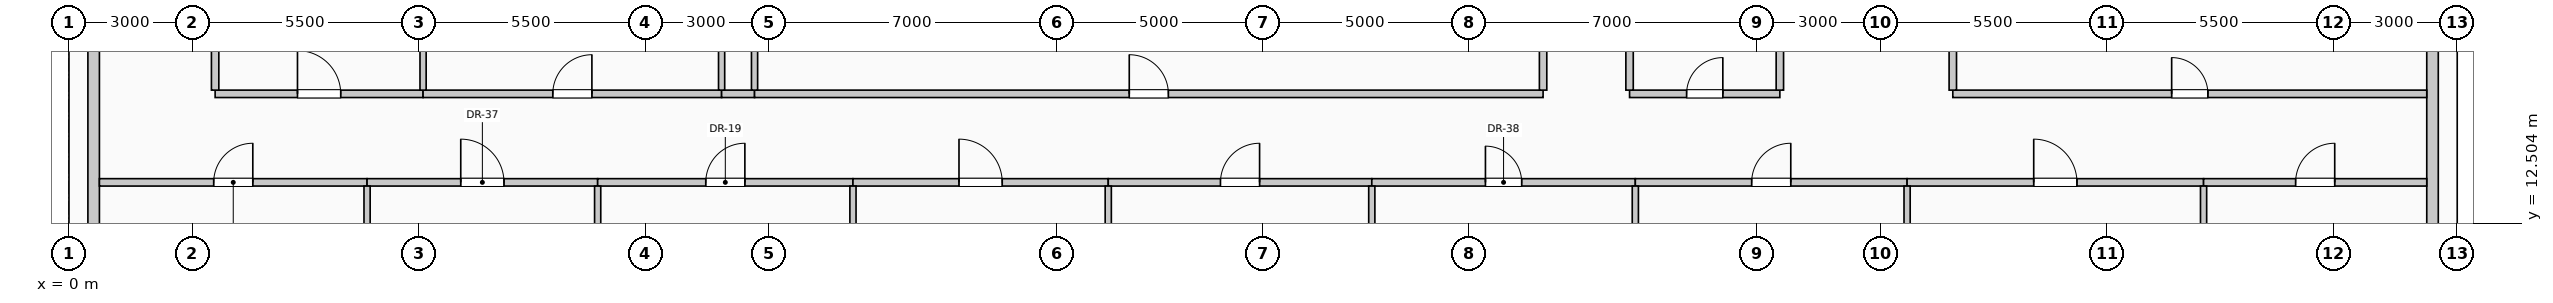
"""IFC4 building model, lengths in metres.
Left out: names, types, materials, properties, quantities, classifications, styles, units other than length and angle.
Written with IfcOpenShell. Run it as: python <this file> out.ifc"""

import sys

from ifc_helpers import new_model, si_unit, direction, frame, frame_2d, origin, place, context, subcontext, project, spatial, rectangle, extrude, element, fill, save


model = new_model("IFC4")
c1 = context("Model", 3, precision=1e-05, world=origin(), true_north=direction((0.0, 1.0)))
c2 = subcontext(c1, "Body", "Model", "MODEL_VIEW")
j1 = project(units=[si_unit("LENGTHUNIT", "METRE"), si_unit("PLANEANGLEUNIT", "RADIAN")], contexts=[c1])
p1 = place(None, origin())
s1 = spatial("IfcSite", under=j1, at=p1, CompositionType="ELEMENT")
p2 = place(p1, origin())
s2 = spatial("IfcBuilding", under=s1, at=p2, CompositionType="ELEMENT")
p3 = place(p2, frame((0.0, 0.0, 144.6)))
s3 = spatial("IfcBuildingStorey", under=s2, at=p3, CompositionType="ELEMENT", Elevation=144.6)
for number, where, z_axis, x_axis in (
    (1, (0.6, 10.445, 0.0), (0.0, 0.0, 1.0), (0.0, 1.0, 0.0)),
    (2, (57.4, 17.555, 0.0), (0.0, 0.0, 1.0), (0.0, -1.0, 0.0)),
):
    element("IfcWall", number, at=place(p3, frame(where, z_axis=z_axis, x_axis=x_axis)), inside=s3, PredefinedType="SOLIDWALL", context=c2, shape_type="SweptSolid", body=[
        extrude(rectangle(XDim=7.11, YDim=0.28, at=frame_2d((3.555, 0.0))), origin(), (0.0, 0.0, 1.0), 2.875),
    ])
p4 = place(p3, frame((0.74, 13.5, 0.0), z_axis=(0.0, 0.0, 1.0), x_axis=(1.0, 0.0, 0.0)))
e3 = element("IfcWall", 3, at=p4, inside=s3, PredefinedType="PARTITIONING", context=c2, shape_type="SweptSolid", body=[
    extrude(rectangle(XDim=6.5, YDim=0.18, at=frame_2d((3.25, 0.0))), origin(), (0.0, 0.0, 1.0), 3.725),
])
p5 = place(p4, frame((2.775, 0.0, 0.0)))
e4 = element("IfcOpeningElement", 4, at=p5, cuts=e3, PredefinedType="OPENING", context=c2, shape_type="SweptSolid", body=[
    extrude(rectangle(XDim=0.95, YDim=2.15, at=frame_2d((0.475, 1.075))), frame((0.0, 0.1, 0.0), z_axis=(0.0, -1.0, 0.0), x_axis=(1.0, 0.0, 0.0)), (0.0, 0.0, 1.0), 0.2),
])
p6 = place(p3, frame((7.24, 13.5, 0.0), z_axis=(0.0, 0.0, 1.0), x_axis=(1.0, 0.0, 0.0)))
e5 = element("IfcWall", 5, at=p6, inside=s3, PredefinedType="PARTITIONING", context=c2, shape_type="SweptSolid", body=[
    extrude(rectangle(XDim=5.6, YDim=0.18, at=frame_2d((2.8, 0.0))), origin(), (0.0, 0.0, 1.0), 3.725),
])
p7 = place(p6, frame((2.275, 0.0, 0.0)))
e6 = element("IfcOpeningElement", 6, at=p7, cuts=e5, PredefinedType="OPENING", context=c2, shape_type="SweptSolid", body=[
    extrude(rectangle(XDim=1.05, YDim=2.15, at=frame_2d((0.525, 1.075))), frame((0.0, 0.1, 0.0), z_axis=(0.0, -1.0, 0.0), x_axis=(1.0, 0.0, 0.0)), (0.0, 0.0, 1.0), 0.2),
])
p8 = place(p3, frame((12.84, 13.5, 0.0), z_axis=(0.0, 0.0, 1.0), x_axis=(1.0, 0.0, 0.0)))
e7 = element("IfcWall", 7, at=p8, inside=s3, PredefinedType="PARTITIONING", context=c2, shape_type="SweptSolid", body=[
    extrude(rectangle(XDim=6.2, YDim=0.18, at=frame_2d((3.1, 0.0))), origin(), (0.0, 0.0, 1.0), 3.725),
])
p9 = place(p8, frame((2.625, 0.0, 0.0)))
e8 = element("IfcOpeningElement", 8, at=p9, cuts=e7, PredefinedType="OPENING", context=c2, shape_type="SweptSolid", body=[
    extrude(rectangle(XDim=0.95, YDim=2.15, at=frame_2d((0.475, 1.075))), frame((0.0, 0.1, 0.0), z_axis=(0.0, -1.0, 0.0), x_axis=(1.0, 0.0, 0.0)), (0.0, 0.0, 1.0), 0.2),
])
p10 = place(p3, frame((19.04, 13.5, 0.0), z_axis=(0.0, 0.0, 1.0), x_axis=(1.0, 0.0, 0.0)))
e9 = element("IfcWall", 9, at=p10, inside=s3, PredefinedType="PARTITIONING", context=c2, shape_type="SweptSolid", body=[
    extrude(rectangle(XDim=6.2, YDim=0.18, at=frame_2d((3.1, 0.0))), origin(), (0.0, 0.0, 1.0), 3.725),
])
p11 = place(p10, frame((2.575, 0.0, 0.0)))
e10 = element("IfcOpeningElement", 10, at=p11, cuts=e9, PredefinedType="OPENING", context=c2, shape_type="SweptSolid", body=[
    extrude(rectangle(XDim=1.05, YDim=2.15, at=frame_2d((0.525, 1.075))), frame((0.0, 0.1, 0.0), z_axis=(0.0, -1.0, 0.0), x_axis=(1.0, 0.0, 0.0)), (0.0, 0.0, 1.0), 0.2),
])
p12 = place(p3, frame((25.24, 13.5, 0.0), z_axis=(0.0, 0.0, 1.0), x_axis=(1.0, 0.0, 0.0)))
e11 = element("IfcWall", 11, at=p12, inside=s3, PredefinedType="PARTITIONING", context=c2, shape_type="SweptSolid", body=[
    extrude(rectangle(XDim=6.4, YDim=0.18, at=frame_2d((3.2, 0.0))), origin(), (0.0, 0.0, 1.0), 3.725),
])
p13 = place(p12, frame((2.725, 0.0, 0.0)))
e12 = element("IfcOpeningElement", 12, at=p13, cuts=e11, PredefinedType="OPENING", context=c2, shape_type="SweptSolid", body=[
    extrude(rectangle(XDim=0.95, YDim=2.15, at=frame_2d((0.475, 1.075))), frame((0.0, 0.1, 0.0), z_axis=(0.0, -1.0, 0.0), x_axis=(1.0, 0.0, 0.0)), (0.0, 0.0, 1.0), 0.2),
])
p14 = place(p3, frame((31.64, 13.5, 0.0), z_axis=(0.0, 0.0, 1.0), x_axis=(1.0, 0.0, 0.0)))
e13 = element("IfcWall", 13, at=p14, inside=s3, PredefinedType="PARTITIONING", context=c2, shape_type="SweptSolid", body=[
    extrude(rectangle(XDim=6.4, YDim=0.18, at=frame_2d((3.2, 0.0))), origin(), (0.0, 0.0, 1.0), 3.725),
])
p15 = place(p14, frame((2.76, 0.0, 0.0)))
e14 = element("IfcOpeningElement", 14, at=p15, cuts=e13, PredefinedType="OPENING", context=c2, shape_type="SweptSolid", body=[
    extrude(rectangle(XDim=0.88, YDim=2.1, at=frame_2d((0.44, 1.05))), frame((0.0, 0.1, 0.0), z_axis=(0.0, -1.0, 0.0), x_axis=(1.0, 0.0, 0.0)), (0.0, 0.0, 1.0), 0.2),
])
p16 = place(p3, frame((38.04, 13.5, 0.0), z_axis=(0.0, 0.0, 1.0), x_axis=(1.0, 0.0, 0.0)))
e15 = element("IfcWall", 15, at=p16, inside=s3, PredefinedType="PARTITIONING", context=c2, shape_type="SweptSolid", body=[
    extrude(rectangle(XDim=6.6, YDim=0.18, at=frame_2d((3.3, 0.0))), origin(), (0.0, 0.0, 1.0), 3.725),
])
p17 = place(p16, frame((2.825, 0.0, 0.0)))
e16 = element("IfcOpeningElement", 16, at=p17, cuts=e15, PredefinedType="OPENING", context=c2, shape_type="SweptSolid", body=[
    extrude(rectangle(XDim=0.95, YDim=2.15, at=frame_2d((0.475, 1.075))), frame((0.0, 0.1, 0.0), z_axis=(0.0, -1.0, 0.0), x_axis=(1.0, 0.0, 0.0)), (0.0, 0.0, 1.0), 0.2),
])
p18 = place(p3, frame((44.64, 13.5, 0.0), z_axis=(0.0, 0.0, 1.0), x_axis=(1.0, 0.0, 0.0)))
e17 = element("IfcWall", 17, at=p18, inside=s3, PredefinedType="PARTITIONING", context=c2, shape_type="SweptSolid", body=[
    extrude(rectangle(XDim=7.2, YDim=0.18, at=frame_2d((3.6, 0.0))), origin(), (0.0, 0.0, 1.0), 3.725),
])
p19 = place(p18, frame((3.075, 0.0, 0.0)))
e18 = element("IfcOpeningElement", 18, at=p19, cuts=e17, PredefinedType="OPENING", context=c2, shape_type="SweptSolid", body=[
    extrude(rectangle(XDim=1.05, YDim=2.15, at=frame_2d((0.525, 1.075))), frame((0.0, 0.1, 0.0), z_axis=(0.0, -1.0, 0.0), x_axis=(1.0, 0.0, 0.0)), (0.0, 0.0, 1.0), 0.2),
])
p20 = place(p3, frame((51.84, 13.5, 0.0), z_axis=(0.0, 0.0, 1.0), x_axis=(1.0, 0.0, 0.0)))
e19 = element("IfcWall", 19, at=p20, inside=s3, PredefinedType="PARTITIONING", context=c2, shape_type="SweptSolid", body=[
    extrude(rectangle(XDim=5.42, YDim=0.18, at=frame_2d((2.71, 0.0))), origin(), (0.0, 0.0, 1.0), 3.725),
])
p21 = place(p20, frame((2.235, 0.0, 0.0)))
e20 = element("IfcOpeningElement", 20, at=p21, cuts=e19, PredefinedType="OPENING", context=c2, shape_type="SweptSolid", body=[
    extrude(rectangle(XDim=0.95, YDim=2.15, at=frame_2d((0.475, 1.075))), frame((0.0, 0.1, 0.0), z_axis=(0.0, -1.0, 0.0), x_axis=(1.0, 0.0, 0.0)), (0.0, 0.0, 1.0), 0.2),
])
p22 = place(p3, frame((3.55, 15.65, 0.0), z_axis=(0.0, 0.0, 1.0), x_axis=(1.0, 0.0, 0.0)))
e21 = element("IfcWall", 21, at=p22, inside=s3, PredefinedType="PARTITIONING", context=c2, shape_type="SweptSolid", body=[
    extrude(rectangle(XDim=5.05, YDim=0.18, at=frame_2d((2.525, 0.0))), origin(), (0.0, 0.0, 1.0), 3.725),
])
p23 = place(p22, frame((2.0, 0.0, 0.0)))
e22 = element("IfcOpeningElement", 22, at=p23, cuts=e21, PredefinedType="OPENING", context=c2, shape_type="SweptSolid", body=[
    extrude(rectangle(XDim=1.05, YDim=2.15, at=frame_2d((0.525, 1.075))), frame((0.0, 0.1, 0.0), z_axis=(0.0, -1.0, 0.0), x_axis=(1.0, 0.0, 0.0)), (0.0, 0.0, 1.0), 0.2),
])
p24 = place(p3, frame((8.6, 15.65, 0.0), z_axis=(0.0, 0.0, 1.0), x_axis=(1.0, 0.0, 0.0)))
e23 = element("IfcWall", 23, at=p24, inside=s3, PredefinedType="PARTITIONING", context=c2, shape_type="SweptSolid", body=[
    extrude(rectangle(XDim=7.25, YDim=0.18, at=frame_2d((3.625, 0.0))), origin(), (0.0, 0.0, 1.0), 3.725),
])
p25 = place(p24, frame((3.15, 0.0, 0.0)))
e24 = element("IfcOpeningElement", 24, at=p25, cuts=e23, PredefinedType="OPENING", context=c2, shape_type="SweptSolid", body=[
    extrude(rectangle(XDim=0.95, YDim=2.15, at=frame_2d((0.475, 1.075))), frame((0.0, 0.1, 0.0), z_axis=(0.0, -1.0, 0.0), x_axis=(1.0, 0.0, 0.0)), (0.0, 0.0, 1.0), 0.2),
])
p26 = place(p3, frame((15.85, 15.65, 0.0), z_axis=(0.0, 0.0, 1.0), x_axis=(1.0, 0.0, 0.0)))
e25 = element("IfcWall", 25, at=p26, inside=s3, PredefinedType="PARTITIONING", context=c2, shape_type="SweptSolid", body=[
    extrude(rectangle(XDim=0.8, YDim=0.18, at=frame_2d((0.4, 0.0))), origin(), (0.0, 0.0, 1.0), 3.725),
])
p27 = place(p3, frame((16.65, 15.65, 0.0), z_axis=(0.0, 0.0, 1.0), x_axis=(1.0, 0.0, 0.0)))
e26 = element("IfcWall", 26, at=p27, inside=s3, PredefinedType="PARTITIONING", context=c2, shape_type="SweptSolid", body=[
    extrude(rectangle(XDim=19.15, YDim=0.18, at=frame_2d((9.575, 0.0))), origin(), (0.0, 0.0, 1.0), 3.725),
])
p28 = place(p27, frame((9.1, 0.0, 0.0)))
e27 = element("IfcOpeningElement", 27, at=p28, cuts=e26, PredefinedType="OPENING", context=c2, shape_type="SweptSolid", body=[
    extrude(rectangle(XDim=0.95, YDim=2.15, at=frame_2d((0.475, 1.075))), frame((0.0, 0.1, 0.0), z_axis=(0.0, -1.0, 0.0), x_axis=(1.0, 0.0, 0.0)), (0.0, 0.0, 1.0), 0.2),
])
p29 = place(p3, frame((37.9, 15.65, 0.0), z_axis=(0.0, 0.0, 1.0), x_axis=(1.0, 0.0, 0.0)))
e28 = element("IfcWall", 28, at=p29, inside=s3, PredefinedType="PARTITIONING", context=c2, shape_type="SweptSolid", body=[
    extrude(rectangle(XDim=3.65, YDim=0.18, at=frame_2d((1.825, 0.0))), origin(), (0.0, 0.0, 1.0), 3.725),
])
p30 = place(p29, frame((1.385, 0.0, 0.0)))
e29 = element("IfcOpeningElement", 29, at=p30, cuts=e28, PredefinedType="OPENING", context=c2, shape_type="SweptSolid", body=[
    extrude(rectangle(XDim=0.88, YDim=2.1, at=frame_2d((0.44, 1.05))), frame((0.0, 0.1, 0.0), z_axis=(0.0, -1.0, 0.0), x_axis=(1.0, 0.0, 0.0)), (0.0, 0.0, 1.0), 0.2),
])
p31 = place(p3, frame((45.75, 15.65, 0.0), z_axis=(0.0, 0.0, 1.0), x_axis=(1.0, 0.0, 0.0)))
e30 = element("IfcWall", 30, at=p31, inside=s3, PredefinedType="PARTITIONING", context=c2, shape_type="SweptSolid", body=[
    extrude(rectangle(XDim=11.51, YDim=0.18, at=frame_2d((5.755, 0.0))), origin(), (0.0, 0.0, 1.0), 3.725),
])
p32 = place(p31, frame((5.315, 0.0, 0.0)))
e31 = element("IfcOpeningElement", 31, at=p32, cuts=e30, PredefinedType="OPENING", context=c2, shape_type="SweptSolid", body=[
    extrude(rectangle(XDim=0.88, YDim=2.1, at=frame_2d((0.44, 1.05))), frame((0.0, 0.1, 0.0), z_axis=(0.0, -1.0, 0.0), x_axis=(1.0, 0.0, 0.0)), (0.0, 0.0, 1.0), 0.2),
])
p33 = place(p3, frame((3.55, 15.74, 0.0), z_axis=(0.0, 0.0, 1.0), x_axis=(0.0, 1.0, 0.0)))
e32 = element("IfcWall", 32, at=p33, inside=s3, PredefinedType="PARTITIONING", context=c2, shape_type="SweptSolid", body=[
    extrude(rectangle(XDim=3.135, YDim=0.18, at=frame_2d((1.567, 0.0))), origin(), (0.0, 0.0, 1.0), 3.725),
])
p34 = place(p3, frame((7.24, 0.74, 0.0), z_axis=(0.0, 0.0, 1.0), x_axis=(0.0, 1.0, 0.0)))
e33 = element("IfcWall", 33, at=p34, inside=s3, PredefinedType="PARTITIONING", context=c2, shape_type="SweptSolid", body=[
    extrude(rectangle(XDim=12.67, YDim=0.15, at=frame_2d((6.335, 0.0))), origin(), (0.0, 0.0, 1.0), 3.725),
])
p35 = place(p3, frame((8.6, 15.74, 0.0), z_axis=(0.0, 0.0, 1.0), x_axis=(0.0, 1.0, 0.0)))
e34 = element("IfcWall", 34, at=p35, inside=s3, PredefinedType="PARTITIONING", context=c2, shape_type="SweptSolid", body=[
    extrude(rectangle(XDim=3.135, YDim=0.15, at=frame_2d((1.567, 0.0))), origin(), (0.0, 0.0, 1.0), 3.725),
])
p36 = place(p3, frame((12.84, 0.74, 0.0), z_axis=(0.0, 0.0, 1.0), x_axis=(0.0, 1.0, 0.0)))
e35 = element("IfcWall", 35, at=p36, inside=s3, PredefinedType="PARTITIONING", context=c2, shape_type="SweptSolid", body=[
    extrude(rectangle(XDim=12.67, YDim=0.15, at=frame_2d((6.335, 0.0))), origin(), (0.0, 0.0, 1.0), 3.725),
])
p37 = place(p3, frame((15.85, 15.74, 0.0), z_axis=(0.0, 0.0, 1.0), x_axis=(0.0, 1.0, 0.0)))
e36 = element("IfcWall", 36, at=p37, inside=s3, PredefinedType="PARTITIONING", context=c2, shape_type="SweptSolid", body=[
    extrude(rectangle(XDim=1.76, YDim=0.15, at=frame_2d((0.88, 0.0))), origin(), (0.0, 0.0, 1.0), 3.725),
])
p38 = place(p3, frame((16.65, 15.74, 0.0), z_axis=(0.0, 0.0, 1.0), x_axis=(0.0, 1.0, 0.0)))
e37 = element("IfcWall", 37, at=p38, inside=s3, PredefinedType="PARTITIONING", context=c2, shape_type="SweptSolid", body=[
    extrude(rectangle(XDim=1.76, YDim=0.15, at=frame_2d((0.88, 0.0))), origin(), (0.0, 0.0, 1.0), 3.07),
])
for number, where, z_axis, x_axis in (
    (38, (19.04, 0.74, 0.0), (0.0, 0.0, 1.0), (0.0, 1.0, 0.0)),
    (39, (25.24, 0.74, 0.0), (0.0, 0.0, 1.0), (0.0, 1.0, 0.0)),
    (40, (31.64, 0.74, 0.0), (0.0, 0.0, 1.0), (0.0, 1.0, 0.0)),
):
    element("IfcWall", number, at=place(p3, frame(where, z_axis=z_axis, x_axis=x_axis)), inside=s3, PredefinedType="PARTITIONING", context=c2, shape_type="SweptSolid", body=[
        extrude(rectangle(XDim=12.67, YDim=0.15, at=frame_2d((6.335, 0.0))), origin(), (0.0, 0.0, 1.0), 3.725),
    ])
p39 = place(p3, frame((35.8, 15.74, 0.0), z_axis=(0.0, 0.0, 1.0), x_axis=(0.0, 1.0, 0.0)))
e41 = element("IfcWall", 41, at=p39, inside=s3, PredefinedType="PARTITIONING", context=c2, shape_type="SweptSolid", body=[
    extrude(rectangle(XDim=9.185, YDim=0.18, at=frame_2d((4.593, 0.0))), origin(), (0.0, 0.0, 1.0), 3.725),
])
p40 = place(p3, frame((37.9, 15.74, 0.0), z_axis=(0.0, 0.0, 1.0), x_axis=(0.0, 1.0, 0.0)))
e42 = element("IfcWall", 42, at=p40, inside=s3, PredefinedType="PARTITIONING", context=c2, shape_type="SweptSolid", body=[
    extrude(rectangle(XDim=11.17, YDim=0.18, at=frame_2d((5.585, 0.0))), origin(), (0.0, 0.0, 1.0), 3.725),
])
p41 = place(p3, frame((38.04, 0.74, 0.0), z_axis=(0.0, 0.0, 1.0), x_axis=(0.0, 1.0, 0.0)))
e43 = element("IfcWall", 43, at=p41, inside=s3, PredefinedType="PARTITIONING", context=c2, shape_type="SweptSolid", body=[
    extrude(rectangle(XDim=12.67, YDim=0.15, at=frame_2d((6.335, 0.0))), origin(), (0.0, 0.0, 1.0), 3.725),
])
p42 = place(p3, frame((41.55, 15.74, 0.0), z_axis=(0.0, 0.0, 1.0), x_axis=(0.0, 1.0, 0.0)))
e44 = element("IfcWall", 44, at=p42, inside=s3, PredefinedType="PARTITIONING", context=c2, shape_type="SweptSolid", body=[
    extrude(rectangle(XDim=1.76, YDim=0.18, at=frame_2d((0.88, 0.0))), origin(), (0.0, 0.0, 1.0), 3.07),
])
p43 = place(p3, frame((44.64, 0.74, 0.0), z_axis=(0.0, 0.0, 1.0), x_axis=(0.0, 1.0, 0.0)))
e45 = element("IfcWall", 45, at=p43, inside=s3, PredefinedType="PARTITIONING", context=c2, shape_type="SweptSolid", body=[
    extrude(rectangle(XDim=12.67, YDim=0.15, at=frame_2d((6.335, 0.0))), origin(), (0.0, 0.0, 1.0), 3.725),
])
p44 = place(p3, frame((45.75, 15.74, 0.0), z_axis=(0.0, 0.0, 1.0), x_axis=(0.0, 1.0, 0.0)))
e46 = element("IfcWall", 46, at=p44, inside=s3, PredefinedType="PARTITIONING", context=c2, shape_type="SweptSolid", body=[
    extrude(rectangle(XDim=7.035, YDim=0.18, at=frame_2d((3.518, 0.0))), origin(), (0.0, 0.0, 1.0), 3.725),
])
p45 = place(p3, frame((51.84, 0.74, 0.0), z_axis=(0.0, 0.0, 1.0), x_axis=(0.0, 1.0, 0.0)))
e47 = element("IfcWall", 47, at=p45, inside=s3, PredefinedType="PARTITIONING", context=c2, shape_type="SweptSolid", body=[
    extrude(rectangle(XDim=12.67, YDim=0.15, at=frame_2d((6.335, 0.0))), origin(), (0.0, 0.0, 1.0), 3.725),
])
p46 = place(p5, origin())
e48 = element("IfcDoor", 48, at=p46, inside=s3, OperationType="SINGLE_SWING_RIGHT", PredefinedType="DOOR", context=c2, shape_type="SweptSolid", body=[
    extrude(rectangle(XDim=0.95, YDim=2.15, at=frame_2d((0.475, 1.075))), frame((0.0, 0.025, 0.0), z_axis=(0.0, -1.0, 0.0), x_axis=(1.0, 0.0, 0.0)), (0.0, 0.0, 1.0), 0.05),
])
fill(e4, e48)
p47 = place(p7, origin())
e49 = element("IfcDoor", 49, at=p47, inside=s3, OperationType="SINGLE_SWING_LEFT", PredefinedType="DOOR", context=c2, shape_type="SweptSolid", body=[
    extrude(rectangle(XDim=1.05, YDim=2.15, at=frame_2d((0.525, 1.075))), frame((0.0, 0.025, 0.0), z_axis=(0.0, -1.0, 0.0), x_axis=(1.0, 0.0, 0.0)), (0.0, 0.0, 1.0), 0.05),
])
fill(e6, e49)
p48 = place(p9, origin())
e50 = element("IfcDoor", 50, at=p48, inside=s3, OperationType="SINGLE_SWING_RIGHT", PredefinedType="DOOR", context=c2, shape_type="SweptSolid", body=[
    extrude(rectangle(XDim=0.95, YDim=2.15, at=frame_2d((0.475, 1.075))), frame((0.0, 0.025, 0.0), z_axis=(0.0, -1.0, 0.0), x_axis=(1.0, 0.0, 0.0)), (0.0, 0.0, 1.0), 0.05),
])
fill(e8, e50)
p49 = place(p11, origin())
e51 = element("IfcDoor", 51, at=p49, inside=s3, OperationType="SINGLE_SWING_LEFT", PredefinedType="DOOR", context=c2, shape_type="SweptSolid", body=[
    extrude(rectangle(XDim=1.05, YDim=2.15, at=frame_2d((0.525, 1.075))), frame((0.0, 0.025, 0.0), z_axis=(0.0, -1.0, 0.0), x_axis=(1.0, 0.0, 0.0)), (0.0, 0.0, 1.0), 0.05),
])
fill(e10, e51)
p50 = place(p13, origin())
e52 = element("IfcDoor", 52, at=p50, inside=s3, OperationType="SINGLE_SWING_RIGHT", PredefinedType="DOOR", context=c2, shape_type="SweptSolid", body=[
    extrude(rectangle(XDim=0.95, YDim=2.15, at=frame_2d((0.475, 1.075))), frame((0.0, 0.025, 0.0), z_axis=(0.0, -1.0, 0.0), x_axis=(1.0, 0.0, 0.0)), (0.0, 0.0, 1.0), 0.05),
])
fill(e12, e52)
p51 = place(p15, origin())
e53 = element("IfcDoor", 53, at=p51, inside=s3, OperationType="SINGLE_SWING_LEFT", PredefinedType="DOOR", context=c2, shape_type="SweptSolid", body=[
    extrude(rectangle(XDim=0.88, YDim=2.1, at=frame_2d((0.44, 1.05))), frame((0.0, 0.025, 0.0), z_axis=(0.0, -1.0, 0.0), x_axis=(1.0, 0.0, 0.0)), (0.0, 0.0, 1.0), 0.05),
])
fill(e14, e53)
p52 = place(p17, origin())
e54 = element("IfcDoor", 54, at=p52, inside=s3, OperationType="SINGLE_SWING_RIGHT", PredefinedType="DOOR", context=c2, shape_type="SweptSolid", body=[
    extrude(rectangle(XDim=0.95, YDim=2.15, at=frame_2d((0.475, 1.075))), frame((0.0, 0.025, 0.0), z_axis=(0.0, -1.0, 0.0), x_axis=(1.0, 0.0, 0.0)), (0.0, 0.0, 1.0), 0.05),
])
fill(e16, e54)
p53 = place(p19, origin())
e55 = element("IfcDoor", 55, at=p53, inside=s3, OperationType="SINGLE_SWING_LEFT", PredefinedType="DOOR", context=c2, shape_type="SweptSolid", body=[
    extrude(rectangle(XDim=1.05, YDim=2.15, at=frame_2d((0.525, 1.075))), frame((0.0, 0.025, 0.0), z_axis=(0.0, -1.0, 0.0), x_axis=(1.0, 0.0, 0.0)), (0.0, 0.0, 1.0), 0.05),
])
fill(e18, e55)
p54 = place(p21, origin())
e56 = element("IfcDoor", 56, at=p54, inside=s3, OperationType="SINGLE_SWING_RIGHT", PredefinedType="DOOR", context=c2, shape_type="SweptSolid", body=[
    extrude(rectangle(XDim=0.95, YDim=2.15, at=frame_2d((0.475, 1.075))), frame((0.0, 0.025, 0.0), z_axis=(0.0, -1.0, 0.0), x_axis=(1.0, 0.0, 0.0)), (0.0, 0.0, 1.0), 0.05),
])
fill(e20, e56)
p55 = place(p23, origin())
e57 = element("IfcDoor", 57, at=p55, inside=s3, OperationType="SINGLE_SWING_LEFT", PredefinedType="DOOR", context=c2, shape_type="SweptSolid", body=[
    extrude(rectangle(XDim=1.05, YDim=2.15, at=frame_2d((0.525, 1.075))), frame((0.0, 0.025, 0.0), z_axis=(0.0, -1.0, 0.0), x_axis=(1.0, 0.0, 0.0)), (0.0, 0.0, 1.0), 0.05),
])
fill(e22, e57)
p56 = place(p25, origin())
e58 = element("IfcDoor", 58, at=p56, inside=s3, OperationType="SINGLE_SWING_RIGHT", PredefinedType="DOOR", context=c2, shape_type="SweptSolid", body=[
    extrude(rectangle(XDim=0.95, YDim=2.15, at=frame_2d((0.475, 1.075))), frame((0.0, 0.025, 0.0), z_axis=(0.0, -1.0, 0.0), x_axis=(1.0, 0.0, 0.0)), (0.0, 0.0, 1.0), 0.05),
])
fill(e24, e58)
p57 = place(p28, origin())
e59 = element("IfcDoor", 59, at=p57, inside=s3, OperationType="SINGLE_SWING_LEFT", PredefinedType="DOOR", context=c2, shape_type="SweptSolid", body=[
    extrude(rectangle(XDim=0.95, YDim=2.15, at=frame_2d((0.475, 1.075))), frame((0.0, 0.025, 0.0), z_axis=(0.0, -1.0, 0.0), x_axis=(1.0, 0.0, 0.0)), (0.0, 0.0, 1.0), 0.05),
])
fill(e27, e59)
p58 = place(p30, origin())
e60 = element("IfcDoor", 60, at=p58, inside=s3, OperationType="SINGLE_SWING_RIGHT", PredefinedType="DOOR", context=c2, shape_type="SweptSolid", body=[
    extrude(rectangle(XDim=0.88, YDim=2.1, at=frame_2d((0.44, 1.05))), frame((0.0, 0.025, 0.0), z_axis=(0.0, -1.0, 0.0), x_axis=(1.0, 0.0, 0.0)), (0.0, 0.0, 1.0), 0.05),
])
fill(e29, e60)
p59 = place(p32, origin())
e61 = element("IfcDoor", 61, at=p59, inside=s3, OperationType="SINGLE_SWING_LEFT", PredefinedType="DOOR", context=c2, shape_type="SweptSolid", body=[
    extrude(rectangle(XDim=0.88, YDim=2.1, at=frame_2d((0.44, 1.05))), frame((0.0, 0.025, 0.0), z_axis=(0.0, -1.0, 0.0), x_axis=(1.0, 0.0, 0.0)), (0.0, 0.0, 1.0), 0.05),
])
fill(e31, e61)
save(model, sys.argv[1])
